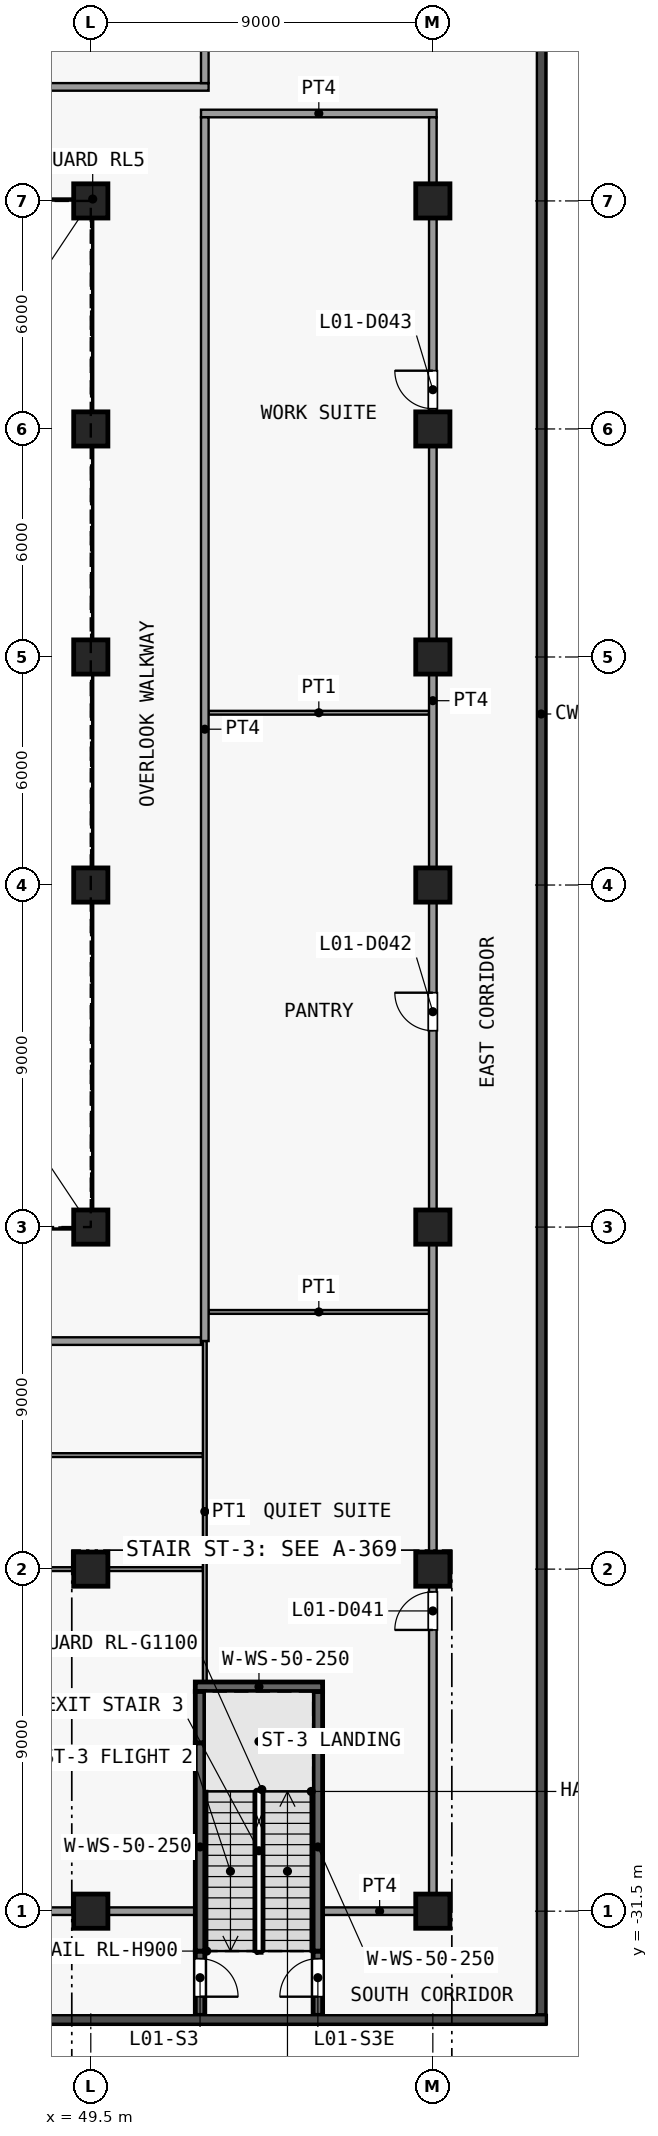
"""IFC4 building model, lengths in metres.
Left out: names, types, materials, properties, quantities, classifications, styles, units other than length and angle.
Written with IfcOpenShell. Run it as: python <this file> out.ifc"""

import sys

from ifc_helpers import new_model, si_unit, direction, frame, frame_2d, origin, origin_2d, place, context, subcontext, project, spatial, rectangle, extrude, element, fill, save


model = new_model("IFC4")
c1 = context("Model", 3, precision=1e-05, world=origin(), true_north=direction((0.0, 1.0)))
c2 = subcontext(c1, "Body", "Model", "MODEL_VIEW")
j1 = project(units=[si_unit("LENGTHUNIT", "METRE"), si_unit("PLANEANGLEUNIT", "RADIAN")], contexts=[c1])
p1 = place(None, origin())
s1 = spatial("IfcSite", under=j1, at=p1, CompositionType="ELEMENT")
p2 = place(p1, origin())
s2 = spatial("IfcBuilding", under=s1, at=p2, CompositionType="ELEMENT")
p3 = place(p2, frame((0.0, 0.0, 8.0)))
s3 = spatial("IfcBuildingStorey", under=s2, at=p3, CompositionType="ELEMENT", Elevation=8.0)
for number, where, z_axis, x_axis in (
    (1, (49.5, -31.5, 0.0), (0.0, 0.0, 1.0), (1.0, 0.0, 0.0)),
    (2, (49.5, -22.5, 0.0), (0.0, 0.0, 1.0), (1.0, 0.0, 0.0)),
    (3, (49.5, -13.5, 0.0), (0.0, 0.0, 1.0), (1.0, 0.0, 0.0)),
    (4, (49.5, -4.5, 0.0), (0.0, 0.0, 1.0), (1.0, 0.0, 0.0)),
    (5, (49.5, 1.5, 0.0), (0.0, 0.0, 1.0), (1.0, 0.0, 0.0)),
    (6, (49.5, 7.5, 0.0), (0.0, 0.0, 1.0), (1.0, 0.0, 0.0)),
    (7, (49.5, 13.5, 0.0), (0.0, 0.0, 1.0), (1.0, 0.0, 0.0)),
    (8, (58.5, -31.5, 0.0), (0.0, 0.0, 1.0), (1.0, 0.0, 0.0)),
    (9, (58.5, -22.5, 0.0), (0.0, 0.0, 1.0), (1.0, 0.0, 0.0)),
    (10, (58.5, -13.5, 0.0), (0.0, 0.0, 1.0), (1.0, 0.0, 0.0)),
    (11, (58.5, -4.5, 0.0), (0.0, 0.0, 1.0), (1.0, 0.0, 0.0)),
    (12, (58.5, 1.5, 0.0), (0.0, 0.0, 1.0), (1.0, 0.0, 0.0)),
    (13, (58.5, 7.5, 0.0), (0.0, 0.0, 1.0), (1.0, 0.0, 0.0)),
    (14, (58.5, 13.5, 0.0), (0.0, 0.0, 1.0), (1.0, 0.0, 0.0)),
):
    element("IfcColumn", number, at=place(p3, frame(where, z_axis=z_axis, x_axis=x_axis)), inside=s3, PredefinedType="COLUMN", context=c2, shape_type="SweptSolid", body=[
        extrude(rectangle(XDim=0.9, YDim=0.9, at=origin_2d()), origin(), (0.0, 0.0, 1.0), 5.5),
    ])
p4 = place(p3, frame((52.375, -32.55, 0.0), z_axis=(0.0, 0.0, 1.0), x_axis=(0.0, -1.0, 0.0)))
e15 = element("IfcWall", 15, at=p4, inside=s3, PredefinedType="SHEAR", context=c2, shape_type="SweptSolid", body=[
    extrude(rectangle(XDim=1.69, YDim=0.25, at=frame_2d((0.845, 0.0))), origin(), (0.0, 0.0, 1.0), 5.15),
])
p5 = place(p4, frame((0.2, 0.0, 0.0)))
e16 = element("IfcOpeningElement", 16, at=p5, cuts=e15, PredefinedType="OPENING", context=c2, shape_type="SweptSolid", body=[
    extrude(rectangle(XDim=1.0, YDim=2.1, at=frame_2d((0.5, 1.05))), frame((0.0, 0.135, 0.0), z_axis=(0.0, -1.0, 0.0), x_axis=(1.0, 0.0, 0.0)), (0.0, 0.0, 1.0), 0.27),
])
p6 = place(p3, frame((52.375, -32.55, 0.0), z_axis=(0.0, 0.0, 1.0), x_axis=(0.0, 1.0, 0.0)))
e17 = element("IfcWall", 17, at=p6, inside=s3, PredefinedType="SHEAR", context=c2, shape_type="SweptSolid", body=[
    extrude(rectangle(XDim=5.48, YDim=0.25, at=frame_2d((2.74, 0.0))), origin(), (0.0, 0.0, 1.0), 5.15),
])
p7 = place(p3, frame((52.375, -27.07, 0.0), z_axis=(0.0, 0.0, 1.0), x_axis=(0.0, 1.0, 0.0)))
e18 = element("IfcWall", 18, at=p7, inside=s3, PredefinedType="SHEAR", context=c2, shape_type="SweptSolid", body=[
    extrude(rectangle(XDim=1.35, YDim=0.25, at=frame_2d((0.675, 0.0))), origin(), (0.0, 0.0, 1.0), 5.15),
])
p8 = place(p3, frame((55.475, -34.24, 0.0), z_axis=(0.0, 0.0, 1.0), x_axis=(0.0, 1.0, 0.0)))
e19 = element("IfcWall", 19, at=p8, inside=s3, PredefinedType="SHEAR", context=c2, shape_type="SweptSolid", body=[
    extrude(rectangle(XDim=1.69, YDim=0.25, at=frame_2d((0.845, 0.0))), origin(), (0.0, 0.0, 1.0), 5.15),
])
p9 = place(p8, frame((0.49, 0.0, 0.0)))
e20 = element("IfcOpeningElement", 20, at=p9, cuts=e19, PredefinedType="OPENING", context=c2, shape_type="SweptSolid", body=[
    extrude(rectangle(XDim=1.0, YDim=2.1, at=frame_2d((0.5, 1.05))), frame((0.0, 0.135, 0.0), z_axis=(0.0, -1.0, 0.0), x_axis=(1.0, 0.0, 0.0)), (0.0, 0.0, 1.0), 0.27),
])
p10 = place(p3, frame((55.475, -32.55, 0.0), z_axis=(0.0, 0.0, 1.0), x_axis=(0.0, 1.0, 0.0)))
e21 = element("IfcWall", 21, at=p10, inside=s3, PredefinedType="SHEAR", context=c2, shape_type="SweptSolid", body=[
    extrude(rectangle(XDim=5.48, YDim=0.25, at=frame_2d((2.74, 0.0))), origin(), (0.0, 0.0, 1.0), 5.15),
])
p11 = place(p3, frame((55.475, -27.07, 0.0), z_axis=(0.0, 0.0, 1.0), x_axis=(0.0, 1.0, 0.0)))
e22 = element("IfcWall", 22, at=p11, inside=s3, PredefinedType="SHEAR", context=c2, shape_type="SweptSolid", body=[
    extrude(rectangle(XDim=1.35, YDim=0.25, at=frame_2d((0.675, 0.0))), origin(), (0.0, 0.0, 1.0), 5.15),
])
p12 = place(p3, frame((52.25, -25.595, 0.0), z_axis=(0.0, 0.0, 1.0), x_axis=(1.0, 0.0, 0.0)))
e23 = element("IfcWall", 23, at=p12, inside=s3, PredefinedType="SHEAR", context=c2, shape_type="SweptSolid", body=[
    extrude(rectangle(XDim=3.35, YDim=0.25, at=frame_2d((1.675, 0.0))), origin(), (0.0, 0.0, 1.0), 5.15),
])
p13 = place(p3, frame((-25.9, -31.5, 0.0), z_axis=(0.0, 0.0, 1.0), x_axis=(1.0, 0.0, 0.0)))
e24 = element("IfcWall", 24, at=p13, inside=s3, PredefinedType="PARTITIONING", context=c2, shape_type="SweptSolid", body=[
    extrude(rectangle(XDim=78.15, YDim=0.2, at=frame_2d((39.075, 0.0))), origin(), (0.0, 0.0, 1.0), 5.15),
])
p14 = place(p13, frame((7.0, 0.0, 0.0)))
e25 = element("IfcOpeningElement", 25, at=p14, cuts=e24, PredefinedType="OPENING", context=c2, shape_type="SweptSolid", body=[
    extrude(rectangle(XDim=1.8, YDim=2.1, at=frame_2d((0.9, 1.05))), frame((0.0, 0.11, 0.0), z_axis=(0.0, -1.0, 0.0), x_axis=(1.0, 0.0, 0.0)), (0.0, 0.0, 1.0), 0.22),
])
p15 = place(p13, frame((31.8, 0.0, 0.0)))
e26 = element("IfcOpeningElement", 26, at=p15, cuts=e24, PredefinedType="OPENING", context=c2, shape_type="SweptSolid", body=[
    extrude(rectangle(XDim=1.8, YDim=2.1, at=frame_2d((0.9, 1.05))), frame((0.0, 0.11, 0.0), z_axis=(0.0, -1.0, 0.0), x_axis=(1.0, 0.0, 0.0)), (0.0, 0.0, 1.0), 0.22),
])
p16 = place(p13, frame((46.8, 0.0, 0.0)))
e27 = element("IfcOpeningElement", 27, at=p16, cuts=e24, PredefinedType="OPENING", context=c2, shape_type="SweptSolid", body=[
    extrude(rectangle(XDim=1.0, YDim=2.1, at=frame_2d((0.5, 1.05))), frame((0.0, 0.11, 0.0), z_axis=(0.0, -1.0, 0.0), x_axis=(1.0, 0.0, 0.0)), (0.0, 0.0, 1.0), 0.22),
])
p17 = place(p13, frame((70.2, 0.0, 0.0)))
e28 = element("IfcOpeningElement", 28, at=p17, cuts=e24, PredefinedType="OPENING", context=c2, shape_type="SweptSolid", body=[
    extrude(rectangle(XDim=1.0, YDim=2.1, at=frame_2d((0.5, 1.05))), frame((0.0, 0.11, 0.0), z_axis=(0.0, -1.0, 0.0), x_axis=(1.0, 0.0, 0.0)), (0.0, 0.0, 1.0), 0.22),
])
p18 = place(p3, frame((55.6, -31.5, 0.0), z_axis=(0.0, 0.0, 1.0), x_axis=(1.0, 0.0, 0.0)))
e29 = element("IfcWall", 29, at=p18, inside=s3, PredefinedType="PARTITIONING", context=c2, shape_type="SweptSolid", body=[
    extrude(rectangle(XDim=3.0, YDim=0.2, at=frame_2d((1.5, 0.0))), origin(), (0.0, 0.0, 1.0), 5.15),
])
p19 = place(p3, frame((31.5, -22.5, 0.0), z_axis=(0.0, 0.0, 1.0), x_axis=(1.0, 0.0, 0.0)))
e30 = element("IfcWall", 30, at=p19, inside=s3, PredefinedType="PARTITIONING", context=c2, shape_type="SweptSolid", body=[
    extrude(rectangle(XDim=20.95, YDim=0.1, at=frame_2d((10.475, 0.0))), origin(), (0.0, 0.0, 1.0), 5.15),
])
p20 = place(p3, frame((31.6, -19.5, 0.0), z_axis=(0.0, 0.0, 1.0), x_axis=(1.0, 0.0, 0.0)))
e31 = element("IfcWall", 31, at=p20, inside=s3, PredefinedType="PARTITIONING", context=c2, shape_type="SweptSolid", body=[
    extrude(rectangle(XDim=20.85, YDim=0.1, at=frame_2d((10.425, 0.0))), origin(), (0.0, 0.0, 1.0), 5.15),
])
p21 = place(p3, frame((31.4, -16.5, 0.0), z_axis=(0.0, 0.0, 1.0), x_axis=(1.0, 0.0, 0.0)))
e32 = element("IfcWall", 32, at=p21, inside=s3, PredefinedType="PARTITIONING", context=c2, shape_type="SweptSolid", body=[
    extrude(rectangle(XDim=21.0, YDim=0.2, at=frame_2d((10.5, 0.0))), origin(), (0.0, 0.0, 1.0), 5.15),
])
p22 = place(p21, frame((3.2, 0.0, 0.0)))
e33 = element("IfcOpeningElement", 33, at=p22, cuts=e32, PredefinedType="OPENING", context=c2, shape_type="SweptSolid", body=[
    extrude(rectangle(XDim=1.0, YDim=2.1, at=frame_2d((0.5, 1.05))), frame((0.0, 0.11, 0.0), z_axis=(0.0, -1.0, 0.0), x_axis=(1.0, 0.0, 0.0)), (0.0, 0.0, 1.0), 0.22),
])
p23 = place(p21, frame((14.0, 0.0, 0.0)))
e34 = element("IfcOpeningElement", 34, at=p23, cuts=e32, PredefinedType="OPENING", context=c2, shape_type="SweptSolid", body=[
    extrude(rectangle(XDim=1.0, YDim=2.1, at=frame_2d((0.5, 1.05))), frame((0.0, 0.11, 0.0), z_axis=(0.0, -1.0, 0.0), x_axis=(1.0, 0.0, 0.0)), (0.0, 0.0, 1.0), 0.22),
])
for number, where, z_axis, x_axis in (
    (35, (52.6, -15.733, 0.0), (0.0, 0.0, 1.0), (1.0, 0.0, 0.0)),
    (36, (52.6, 0.033, 0.0), (0.0, 0.0, 1.0), (1.0, 0.0, 0.0)),
):
    element("IfcWall", number, at=place(p3, frame(where, z_axis=z_axis, x_axis=x_axis)), inside=s3, PredefinedType="PARTITIONING", context=c2, shape_type="SweptSolid", body=[
        extrude(rectangle(XDim=5.8, YDim=0.1, at=frame_2d((2.9, 0.0))), origin(), (0.0, 0.0, 1.0), 5.15),
    ])
p24 = place(p3, frame((52.4, 15.8, 0.0), z_axis=(0.0, 0.0, 1.0), x_axis=(1.0, 0.0, 0.0)))
e37 = element("IfcWall", 37, at=p24, inside=s3, PredefinedType="PARTITIONING", context=c2, shape_type="SweptSolid", body=[
    extrude(rectangle(XDim=6.2, YDim=0.2, at=frame_2d((3.1, 0.0))), origin(), (0.0, 0.0, 1.0), 5.15),
])
p25 = place(p3, frame((28.4, 16.5, 0.0), z_axis=(0.0, 0.0, 1.0), x_axis=(1.0, 0.0, 0.0)))
e38 = element("IfcWall", 38, at=p25, inside=s3, PredefinedType="PARTITIONING", context=c2, shape_type="SweptSolid", body=[
    extrude(rectangle(XDim=24.2, YDim=0.2, at=frame_2d((12.1, 0.0))), origin(), (0.0, 0.0, 1.0), 5.15),
])
p26 = place(p25, frame((6.2, 0.0, 0.0)))
e39 = element("IfcOpeningElement", 39, at=p26, cuts=e38, PredefinedType="OPENING", context=c2, shape_type="SweptSolid", body=[
    extrude(rectangle(XDim=1.0, YDim=2.1, at=frame_2d((0.5, 1.05))), frame((0.0, 0.11, 0.0), z_axis=(0.0, -1.0, 0.0), x_axis=(1.0, 0.0, 0.0)), (0.0, 0.0, 1.0), 0.22),
])
p27 = place(p25, frame((17.0, 0.0, 0.0)))
e40 = element("IfcOpeningElement", 40, at=p27, cuts=e38, PredefinedType="OPENING", context=c2, shape_type="SweptSolid", body=[
    extrude(rectangle(XDim=1.0, YDim=2.1, at=frame_2d((0.5, 1.05))), frame((0.0, 0.11, 0.0), z_axis=(0.0, -1.0, 0.0), x_axis=(1.0, 0.0, 0.0)), (0.0, 0.0, 1.0), 0.22),
])
p28 = place(p3, frame((52.5, -16.5, 0.0), z_axis=(0.0, 0.0, 1.0), x_axis=(0.0, 1.0, 0.0)))
e41 = element("IfcWall", 41, at=p28, inside=s3, PredefinedType="PARTITIONING", context=c2, shape_type="SweptSolid", body=[
    extrude(rectangle(XDim=32.2, YDim=0.2, at=frame_2d((16.1, 0.0))), origin(), (0.0, 0.0, 1.0), 5.15),
])
p29 = place(p3, frame((52.5, 16.6, 0.0), z_axis=(0.0, 0.0, 1.0), x_axis=(0.0, 1.0, 0.0)))
e42 = element("IfcWall", 42, at=p29, inside=s3, PredefinedType="PARTITIONING", context=c2, shape_type="SweptSolid", body=[
    extrude(rectangle(XDim=8.87, YDim=0.2, at=frame_2d((4.435, 0.0))), origin(), (0.0, 0.0, 1.0), 5.15),
])
p30 = place(p29, frame((0.9, 0.0, 0.0)))
e43 = element("IfcOpeningElement", 43, at=p30, cuts=e42, PredefinedType="OPENING", context=c2, shape_type="SweptSolid", body=[
    extrude(rectangle(XDim=1.0, YDim=2.1, at=frame_2d((0.5, 1.05))), frame((0.0, 0.11, 0.0), z_axis=(0.0, -1.0, 0.0), x_axis=(1.0, 0.0, 0.0)), (0.0, 0.0, 1.0), 0.22),
])
p31 = place(p29, frame((5.4, 0.0, 0.0)))
e44 = element("IfcOpeningElement", 44, at=p31, cuts=e42, PredefinedType="OPENING", context=c2, shape_type="SweptSolid", body=[
    extrude(rectangle(XDim=1.0, YDim=2.1, at=frame_2d((0.5, 1.05))), frame((0.0, 0.11, 0.0), z_axis=(0.0, -1.0, 0.0), x_axis=(1.0, 0.0, 0.0)), (0.0, 0.0, 1.0), 0.22),
])
p32 = place(p3, frame((52.5, -25.47, 0.0), z_axis=(0.0, 0.0, 1.0), x_axis=(0.0, 1.0, 0.0)))
e45 = element("IfcWall", 45, at=p32, inside=s3, PredefinedType="PARTITIONING", context=c2, shape_type="SweptSolid", body=[
    extrude(rectangle(XDim=8.97, YDim=0.1, at=frame_2d((4.485, 0.0))), origin(), (0.0, 0.0, 1.0), 5.15),
])
p33 = place(p3, frame((58.5, -31.4, 0.0), z_axis=(0.0, 0.0, 1.0), x_axis=(0.0, 1.0, 0.0)))
e46 = element("IfcWall", 46, at=p33, inside=s3, PredefinedType="PARTITIONING", context=c2, shape_type="SweptSolid", body=[
    extrude(rectangle(XDim=47.1, YDim=0.2, at=frame_2d((23.55, 0.0))), origin(), (0.0, 0.0, 1.0), 5.15),
])
p34 = place(p33, frame((7.3, 0.0, 0.0)))
e47 = element("IfcOpeningElement", 47, at=p34, cuts=e46, PredefinedType="OPENING", context=c2, shape_type="SweptSolid", body=[
    extrude(rectangle(XDim=1.0, YDim=2.1, at=frame_2d((0.5, 1.05))), frame((0.0, 0.11, 0.0), z_axis=(0.0, -1.0, 0.0), x_axis=(1.0, 0.0, 0.0)), (0.0, 0.0, 1.0), 0.22),
])
p35 = place(p33, frame((23.067, 0.0, 0.0)))
e48 = element("IfcOpeningElement", 48, at=p35, cuts=e46, PredefinedType="OPENING", context=c2, shape_type="SweptSolid", body=[
    extrude(rectangle(XDim=1.0, YDim=2.1, at=frame_2d((0.5, 1.05))), frame((0.0, 0.11, 0.0), z_axis=(0.0, -1.0, 0.0), x_axis=(1.0, 0.0, 0.0)), (0.0, 0.0, 1.0), 0.22),
])
p36 = place(p33, frame((39.433, 0.0, 0.0)))
e49 = element("IfcOpeningElement", 49, at=p36, cuts=e46, PredefinedType="OPENING", context=c2, shape_type="SweptSolid", body=[
    extrude(rectangle(XDim=1.0, YDim=2.1, at=frame_2d((0.5, 1.05))), frame((0.0, 0.11, 0.0), z_axis=(0.0, -1.0, 0.0), x_axis=(1.0, 0.0, 0.0)), (0.0, 0.0, 1.0), 0.22),
])
p37 = place(p5, origin())
e50 = element("IfcDoor", 50, at=p37, inside=s3, OperationType="SINGLE_SWING_RIGHT", PredefinedType="DOOR", context=c2, shape_type="SweptSolid", body=[
    extrude(rectangle(XDim=1.0, YDim=2.1, at=frame_2d((0.5, 1.05))), frame((0.0, 0.025, 0.0), z_axis=(0.0, -1.0, 0.0), x_axis=(1.0, 0.0, 0.0)), (0.0, 0.0, 1.0), 0.05),
])
fill(e16, e50)
p38 = place(p9, origin())
e51 = element("IfcDoor", 51, at=p38, inside=s3, OperationType="SINGLE_SWING_LEFT", PredefinedType="DOOR", context=c2, shape_type="SweptSolid", body=[
    extrude(rectangle(XDim=1.0, YDim=2.1, at=frame_2d((0.5, 1.05))), frame((0.0, 0.025, 0.0), z_axis=(0.0, -1.0, 0.0), x_axis=(1.0, 0.0, 0.0)), (0.0, 0.0, 1.0), 0.05),
])
fill(e20, e51)
p39 = place(p34, origin())
e52 = element("IfcDoor", 52, at=p39, inside=s3, OperationType="SINGLE_SWING_RIGHT", PredefinedType="DOOR", context=c2, shape_type="SweptSolid", body=[
    extrude(rectangle(XDim=1.0, YDim=2.1, at=frame_2d((0.5, 1.05))), frame((0.0, 0.025, 0.0), z_axis=(0.0, -1.0, 0.0), x_axis=(1.0, 0.0, 0.0)), (0.0, 0.0, 1.0), 0.05),
])
fill(e47, e52)
p40 = place(p35, origin())
e53 = element("IfcDoor", 53, at=p40, inside=s3, OperationType="SINGLE_SWING_LEFT", PredefinedType="DOOR", context=c2, shape_type="SweptSolid", body=[
    extrude(rectangle(XDim=1.0, YDim=2.1, at=frame_2d((0.5, 1.05))), frame((0.0, 0.025, 0.0), z_axis=(0.0, -1.0, 0.0), x_axis=(1.0, 0.0, 0.0)), (0.0, 0.0, 1.0), 0.05),
])
fill(e48, e53)
p41 = place(p36, origin())
e54 = element("IfcDoor", 54, at=p41, inside=s3, OperationType="SINGLE_SWING_LEFT", PredefinedType="DOOR", context=c2, shape_type="SweptSolid", body=[
    extrude(rectangle(XDim=1.0, YDim=2.1, at=frame_2d((0.5, 1.05))), frame((0.0, 0.025, 0.0), z_axis=(0.0, -1.0, 0.0), x_axis=(1.0, 0.0, 0.0)), (0.0, 0.0, 1.0), 0.05),
])
fill(e49, e54)
save(model, sys.argv[1])
